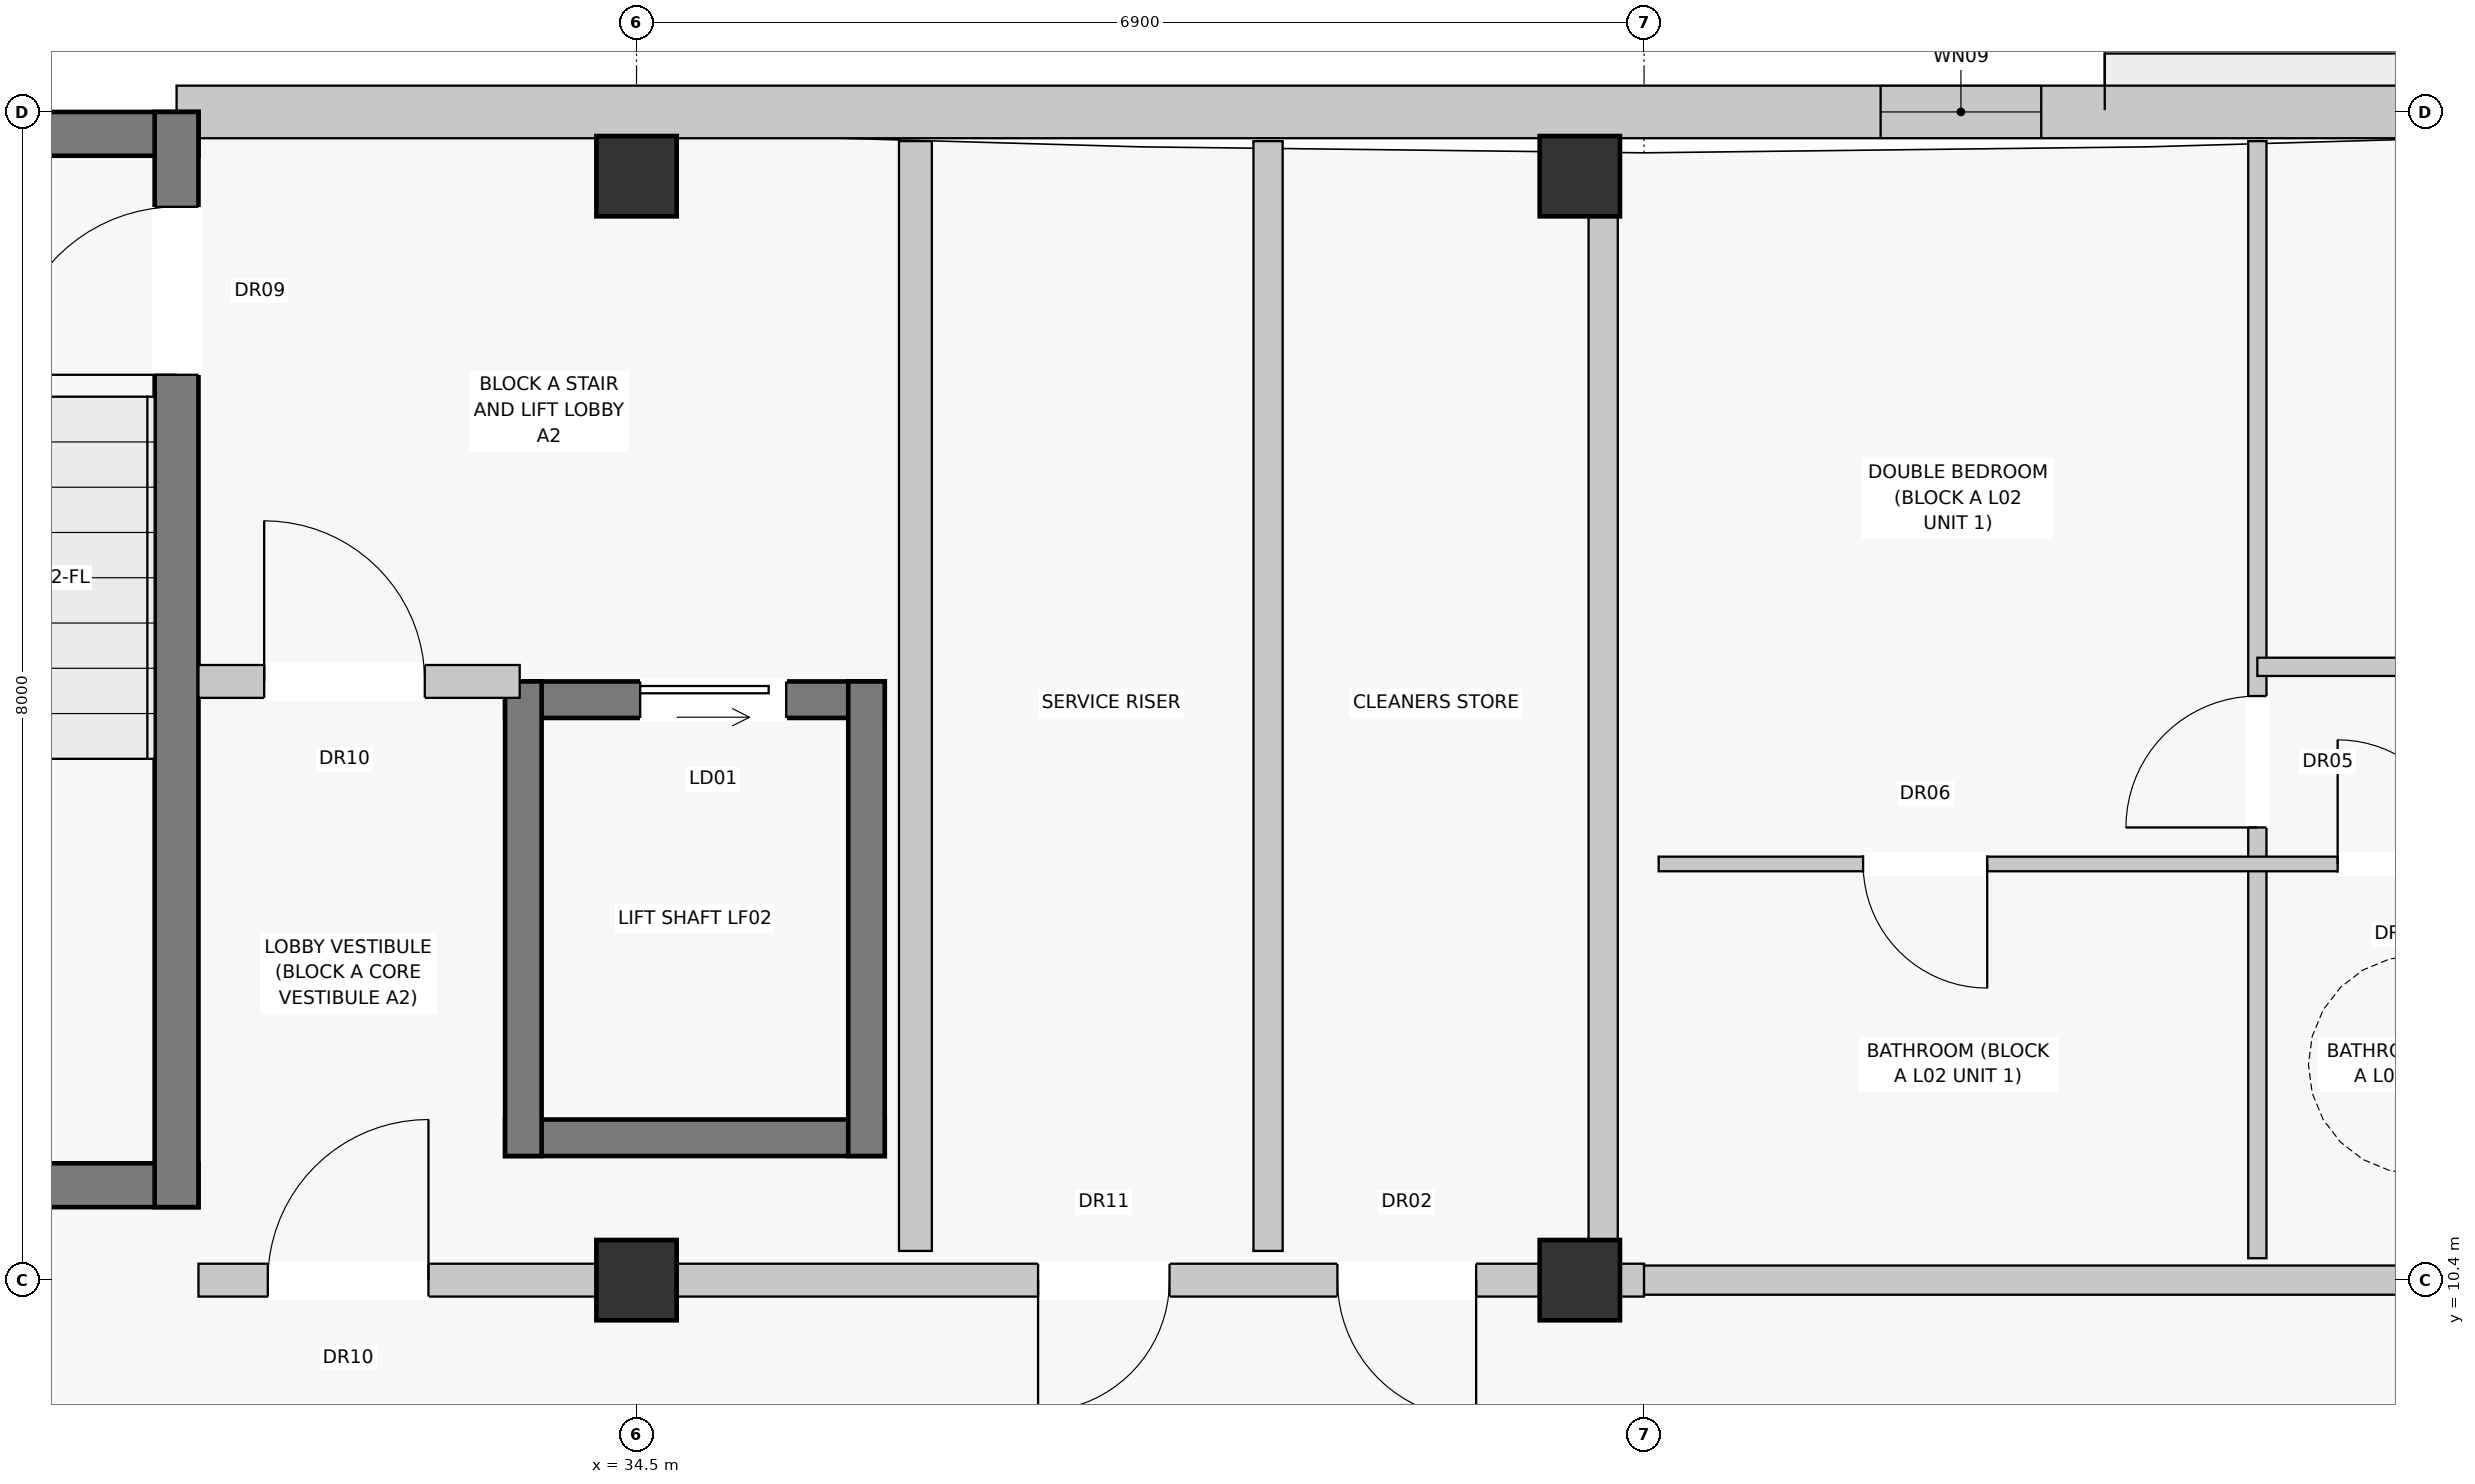
"""IFC4 building model, lengths in metres.
Left out: names, types, materials, properties, quantities, classifications, styles, units other than length and angle.
Written with IfcOpenShell. Run it as: python <this file> out.ifc"""

import sys

from ifc_helpers import new_model, si_unit, direction, frame, frame_2d, origin, origin_with_axes, origin_2d, place, context, subcontext, project, spatial, rectangle, extrude, element, fill, save


model = new_model("IFC4")
c1 = context("Model", 3, precision=1e-05, world=origin(), true_north=direction((0.0, 1.0)))
c2 = subcontext(c1, "Body", "Model", "MODEL_VIEW")
j1 = project(units=[si_unit("LENGTHUNIT", "METRE"), si_unit("PLANEANGLEUNIT", "RADIAN")], contexts=[c1])
p1 = place(None, origin())
s1 = spatial("IfcSite", under=j1, at=p1, CompositionType="ELEMENT")
p2 = place(p1, origin())
s2 = spatial("IfcBuilding", under=s1, at=p2, CompositionType="ELEMENT")
p3 = place(p2, frame((0.0, 0.0, 8.0)))
s3 = spatial("IfcBuildingStorey", under=s2, at=p3, CompositionType="ELEMENT", Elevation=8.0)
for number, where, z_axis, x_axis in (
    (1, (34.5, 10.4, 0.0), (0.0, 0.0, 1.0), (1.0, 0.0, 0.0)),
    (2, (34.5, 17.96, 0.0), (0.0, 0.0, 1.0), (1.0, 0.0, 0.0)),
    (3, (40.96, 10.4, 0.0), (0.0, 0.0, 1.0), (1.0, 0.0, 0.0)),
    (4, (40.96, 17.96, 0.0), (0.0, 0.0, 1.0), (1.0, 0.0, 0.0)),
):
    element("IfcColumn", number, at=place(p3, frame(where, z_axis=z_axis, x_axis=x_axis)), inside=s3, PredefinedType="COLUMN", context=c2, shape_type="SweptSolid", body=[
        extrude(rectangle(XDim=0.55, YDim=0.55, at=origin_2d()), origin(), (0.0, 0.0, 1.0), 3.2),
    ])
p4 = place(p3, frame((31.35, 18.4, 0.0), z_axis=(0.0, 0.0, 1.0), x_axis=(1.0, 0.0, 0.0)))
e5 = element("IfcWall", 5, at=p4, inside=s3, PredefinedType="STANDARD", context=c2, shape_type="SweptSolid", body=[
    extrude(rectangle(XDim=23.68, YDim=0.36, at=frame_2d((11.84, 0.0))), origin(), (0.0, 0.0, 1.0), 2.94),
])
p5 = place(p4, frame((15.27, 0.0, 0.0)))
e6 = element("IfcOpeningElement", 6, at=p5, cuts=e5, PredefinedType="OPENING", context=c2, shape_type="SweptSolid", body=[
    extrude(rectangle(XDim=1.05, YDim=2.12, at=frame_2d((0.525, 1.06))), frame((0.0, 0.192, 0.0), z_axis=(0.0, -1.0, 0.0), x_axis=(1.0, 0.0, 0.0)), (0.0, 0.0, 1.0), 0.384),
])
p6 = place(p4, frame((11.67, 0.0, 0.72)))
e7 = element("IfcOpeningElement", 7, at=p6, cuts=e5, PredefinedType="OPENING", context=c2, shape_type="SweptSolid", body=[
    extrude(rectangle(XDim=1.1, YDim=1.5, at=frame_2d((0.55, 0.75))), frame((0.0, 0.192, 0.0), z_axis=(0.0, -1.0, 0.0), x_axis=(1.0, 0.0, 0.0)), (0.0, 0.0, 1.0), 0.384),
])
p7 = place(p4, frame((17.52, 0.0, 0.9)))
e8 = element("IfcOpeningElement", 8, at=p7, cuts=e5, PredefinedType="OPENING", context=c2, shape_type="SweptSolid", body=[
    extrude(rectangle(XDim=0.95, YDim=1.55, at=frame_2d((0.475, 0.775))), frame((0.0, 0.192, 0.0), z_axis=(0.0, -1.0, 0.0), x_axis=(1.0, 0.0, 0.0)), (0.0, 0.0, 1.0), 0.384),
])
p8 = place(p4, frame((20.67, 0.0, 0.72)))
e9 = element("IfcOpeningElement", 9, at=p8, cuts=e5, PredefinedType="OPENING", context=c2, shape_type="SweptSolid", body=[
    extrude(rectangle(XDim=1.1, YDim=1.5, at=frame_2d((0.55, 0.75))), frame((0.0, 0.192, 0.0), z_axis=(0.0, -1.0, 0.0), x_axis=(1.0, 0.0, 0.0)), (0.0, 0.0, 1.0), 0.384),
])
for number, where, z_axis, x_axis in (
    (10, (27.9, 18.25, 0.0), (0.0, 0.0, 1.0), (1.0, 0.0, 0.0)),
    (11, (27.9, 11.05, 0.0), (0.0, 0.0, 1.0), (1.0, 0.0, 0.0)),
):
    element("IfcWall", number, at=place(p3, frame(where, z_axis=z_axis, x_axis=x_axis)), inside=s3, PredefinedType="SHEAR", context=c2, shape_type="SweptSolid", body=[
        extrude(rectangle(XDim=3.6, YDim=0.3, at=frame_2d((1.8, 0.0))), origin(), (0.0, 0.0, 1.0), 2.94),
    ])
p9 = place(p3, frame((31.35, 10.9, 0.0), z_axis=(0.0, 0.0, 1.0), x_axis=(0.0, 1.0, 0.0)))
e12 = element("IfcWall", 12, at=p9, inside=s3, PredefinedType="SHEAR", context=c2, shape_type="SweptSolid", body=[
    extrude(rectangle(XDim=7.5, YDim=0.3, at=frame_2d((3.75, 0.0))), origin(), (0.0, 0.0, 1.0), 2.94),
])
p10 = place(p9, frame((5.7, 0.0, 0.0)))
e13 = element("IfcOpeningElement", 13, at=p10, cuts=e12, PredefinedType="OPENING", context=c2, shape_type="SweptSolid", body=[
    extrude(rectangle(XDim=1.15, YDim=2.15, at=frame_2d((0.575, 1.075))), frame((0.0, 0.162, 0.0), z_axis=(0.0, -1.0, 0.0), x_axis=(1.0, 0.0, 0.0)), (0.0, 0.0, 1.0), 0.324),
])
p11 = place(p3, frame((33.6, 14.375, 0.0), z_axis=(0.0, 0.0, 1.0), x_axis=(1.0, 0.0, 0.0)))
e14 = element("IfcWall", 14, at=p11, inside=s3, PredefinedType="SHEAR", context=c2, shape_type="SweptSolid", body=[
    extrude(rectangle(XDim=2.6, YDim=0.25, at=frame_2d((1.3, 0.0))), origin(), (0.0, 0.0, 1.0), 2.94),
])
p12 = place(p11, frame((0.925, 0.0, 0.0)))
e15 = element("IfcOpeningElement", 15, at=p12, cuts=e14, PredefinedType="OPENING", context=c2, shape_type="SweptSolid", body=[
    extrude(rectangle(XDim=1.0, YDim=2.1, at=frame_2d((0.5, 1.05))), frame((0.0, 0.137, 0.0), z_axis=(0.0, -1.0, 0.0), x_axis=(1.0, 0.0, 0.0)), (0.0, 0.0, 1.0), 0.274),
])
p13 = place(p3, frame((33.6, 11.375, 0.0), z_axis=(0.0, 0.0, 1.0), x_axis=(1.0, 0.0, 0.0)))
e16 = element("IfcWall", 16, at=p13, inside=s3, PredefinedType="SHEAR", context=c2, shape_type="SweptSolid", body=[
    extrude(rectangle(XDim=2.6, YDim=0.25, at=frame_2d((1.3, 0.0))), origin(), (0.0, 0.0, 1.0), 2.94),
])
for number, where, z_axis, x_axis in (
    (17, (33.725, 11.25, 0.0), (0.0, 0.0, 1.0), (0.0, 1.0, 0.0)),
    (18, (36.075, 11.25, 0.0), (0.0, 0.0, 1.0), (0.0, 1.0, 0.0)),
):
    element("IfcWall", number, at=place(p3, frame(where, z_axis=z_axis, x_axis=x_axis)), inside=s3, PredefinedType="SHEAR", context=c2, shape_type="SweptSolid", body=[
        extrude(rectangle(XDim=3.25, YDim=0.25, at=frame_2d((1.625, 0.0))), origin(), (0.0, 0.0, 1.0), 2.94),
    ])
p14 = place(p3, frame((36.41, 10.6, 0.0), z_axis=(0.0, 0.0, 1.0), x_axis=(0.0, 1.0, 0.0)))
e19 = element("IfcWall", 19, at=p14, inside=s3, PredefinedType="PARTITIONING", context=c2, shape_type="SweptSolid", body=[
    extrude(rectangle(XDim=7.6, YDim=0.225, at=frame_2d((3.8, 0.0))), origin(), (0.0, 0.0, 1.0), 2.59),
])
p15 = place(p3, frame((31.5, 14.5, 0.0), z_axis=(0.0, 0.0, 1.0), x_axis=(1.0, 0.0, 0.0)))
e20 = element("IfcWall", 20, at=p15, inside=s3, PredefinedType="PARTITIONING", context=c2, shape_type="SweptSolid", body=[
    extrude(rectangle(XDim=2.2, YDim=0.225, at=frame_2d((1.1, 0.0))), origin(), (0.0, 0.0, 1.0), 2.94),
])
p16 = place(p15, frame((0.45, 0.0, 0.0)))
e21 = element("IfcOpeningElement", 21, at=p16, cuts=e20, PredefinedType="OPENING", context=c2, shape_type="SweptSolid", body=[
    extrude(rectangle(XDim=1.1, YDim=2.15, at=frame_2d((0.55, 1.075))), frame((0.0, 0.125, 0.0), z_axis=(0.0, -1.0, 0.0), x_axis=(1.0, 0.0, 0.0)), (0.0, 0.0, 1.0), 0.249),
])
for number, where, z_axis, x_axis in (
    (22, (38.825, 10.6, 0.0), (0.0, 0.0, 1.0), (0.0, 1.0, 0.0)),
    (23, (41.12, 10.6, 0.0), (0.0, 0.0, 1.0), (0.0, 1.0, 0.0)),
):
    element("IfcWall", number, at=place(p3, frame(where, z_axis=z_axis, x_axis=x_axis)), inside=s3, PredefinedType="PARTITIONING", context=c2, shape_type="SweptSolid", body=[
        extrude(rectangle(XDim=7.6, YDim=0.2, at=frame_2d((3.8, 0.0))), origin(), (0.0, 0.0, 1.0), 2.94),
    ])
p17 = place(p3, frame((31.5, 10.4, 0.0), z_axis=(0.0, 0.0, 1.0), x_axis=(1.0, 0.0, 0.0)))
e24 = element("IfcWall", 24, at=p17, inside=s3, PredefinedType="PARTITIONING", context=c2, shape_type="SweptSolid", body=[
    extrude(rectangle(XDim=9.9, YDim=0.225, at=frame_2d((4.95, 0.0))), origin(), (0.0, 0.0, 1.0), 2.38),
])
p18 = place(p17, frame((0.475, 0.0, 0.0)))
e25 = element("IfcOpeningElement", 25, at=p18, cuts=e24, PredefinedType="OPENING", context=c2, shape_type="SweptSolid", body=[
    extrude(rectangle(XDim=1.1, YDim=2.15, at=frame_2d((0.55, 1.075))), frame((0.0, 0.125, 0.0), z_axis=(0.0, -1.0, 0.0), x_axis=(1.0, 0.0, 0.0)), (0.0, 0.0, 1.0), 0.249),
])
p19 = place(p17, frame((5.75, 0.0, 0.0)))
e26 = element("IfcOpeningElement", 26, at=p19, cuts=e24, PredefinedType="OPENING", context=c2, shape_type="SweptSolid", body=[
    extrude(rectangle(XDim=0.9, YDim=2.1, at=frame_2d((0.45, 1.05))), frame((0.0, 0.125, 0.0), z_axis=(0.0, -1.0, 0.0), x_axis=(1.0, 0.0, 0.0)), (0.0, 0.0, 1.0), 0.249),
])
p20 = place(p17, frame((7.8, 0.0, 0.0)))
e27 = element("IfcOpeningElement", 27, at=p20, cuts=e24, PredefinedType="OPENING", context=c2, shape_type="SweptSolid", body=[
    extrude(rectangle(XDim=0.95, YDim=2.15, at=frame_2d((0.475, 1.075))), frame((0.0, 0.125, 0.0), z_axis=(0.0, -1.0, 0.0), x_axis=(1.0, 0.0, 0.0)), (0.0, 0.0, 1.0), 0.249),
])
p21 = place(p3, frame((41.4, 10.4, 0.0), z_axis=(0.0, 0.0, 1.0), x_axis=(1.0, 0.0, 0.0)))
e28 = element("IfcWall", 28, at=p21, inside=s3, PredefinedType="PARTITIONING", context=c2, shape_type="SweptSolid", body=[
    extrude(rectangle(XDim=13.8, YDim=0.2, at=frame_2d((6.9, 0.0))), origin(), (0.0, 0.0, 1.0), 2.38),
])
p22 = place(p21, frame((9.6, 0.0, 0.0)))
e29 = element("IfcOpeningElement", 29, at=p22, cuts=e28, PredefinedType="OPENING", context=c2, shape_type="SweptSolid", body=[
    extrude(rectangle(XDim=0.95, YDim=2.15, at=frame_2d((0.475, 1.075))), frame((0.0, 0.112, 0.0), z_axis=(0.0, -1.0, 0.0), x_axis=(1.0, 0.0, 0.0)), (0.0, 0.0, 1.0), 0.224),
])
p23 = place(p3, frame((45.6, 10.55, 0.0), z_axis=(0.0, 0.0, 1.0), x_axis=(0.0, 1.0, 0.0)))
e30 = element("IfcWall", 30, at=p23, inside=s3, PredefinedType="PARTITIONING", context=c2, shape_type="SweptSolid", body=[
    extrude(rectangle(XDim=7.65, YDim=0.125, at=frame_2d((3.825, 0.0))), origin(), (0.0, 0.0, 1.0), 2.94),
])
p24 = place(p23, frame((2.95, 0.0, 0.0)))
e31 = element("IfcOpeningElement", 31, at=p24, cuts=e30, PredefinedType="OPENING", context=c2, shape_type="SweptSolid", body=[
    extrude(rectangle(XDim=0.9, YDim=2.1, at=frame_2d((0.45, 1.05))), frame((0.0, 0.074, 0.0), z_axis=(0.0, -1.0, 0.0), x_axis=(1.0, 0.0, 0.0)), (0.0, 0.0, 1.0), 0.149),
])
p25 = place(p3, frame((41.5, 13.25, 0.0), z_axis=(0.0, 0.0, 1.0), x_axis=(1.0, 0.0, 0.0)))
e32 = element("IfcWall", 32, at=p25, inside=s3, PredefinedType="PARTITIONING", context=c2, shape_type="SweptSolid", body=[
    extrude(rectangle(XDim=8.6, YDim=0.1, at=frame_2d((4.3, 0.0))), origin(), (0.0, 0.0, 1.0), 2.94),
])
p26 = place(p25, frame((1.4, 0.0, 0.0)))
e33 = element("IfcOpeningElement", 33, at=p26, cuts=e32, PredefinedType="OPENING", context=c2, shape_type="SweptSolid", body=[
    extrude(rectangle(XDim=0.85, YDim=2.05, at=frame_2d((0.425, 1.025))), frame((0.0, 0.062, 0.0), z_axis=(0.0, -1.0, 0.0), x_axis=(1.0, 0.0, 0.0)), (0.0, 0.0, 1.0), 0.124),
])
p27 = place(p25, frame((4.65, 0.0, 0.0)))
e34 = element("IfcOpeningElement", 34, at=p27, cuts=e32, PredefinedType="OPENING", context=c2, shape_type="SweptSolid", body=[
    extrude(rectangle(XDim=0.85, YDim=2.05, at=frame_2d((0.425, 1.025))), frame((0.0, 0.062, 0.0), z_axis=(0.0, -1.0, 0.0), x_axis=(1.0, 0.0, 0.0)), (0.0, 0.0, 1.0), 0.124),
])
p28 = place(p25, frame((6.8, 0.0, 0.0)))
e35 = element("IfcOpeningElement", 35, at=p28, cuts=e32, PredefinedType="OPENING", context=c2, shape_type="SweptSolid", body=[
    extrude(rectangle(XDim=0.85, YDim=2.1, at=frame_2d((0.425, 1.05))), frame((0.0, 0.062, 0.0), z_axis=(0.0, -1.0, 0.0), x_axis=(1.0, 0.0, 0.0)), (0.0, 0.0, 1.0), 0.124),
])
p29 = place(p3, frame((45.6, 14.6, 0.0), z_axis=(0.0, 0.0, 1.0), x_axis=(1.0, 0.0, 0.0)))
e36 = element("IfcWall", 36, at=p29, inside=s3, PredefinedType="PARTITIONING", context=c2, shape_type="SweptSolid", body=[
    extrude(rectangle(XDim=4.5, YDim=0.125, at=frame_2d((2.25, 0.0))), origin(), (0.0, 0.0, 1.0), 2.94),
])
p30 = place(p29, frame((1.6, 0.0, 0.0)))
e37 = element("IfcOpeningElement", 37, at=p30, cuts=e36, PredefinedType="OPENING", context=c2, shape_type="SweptSolid", body=[
    extrude(rectangle(XDim=0.9, YDim=2.1, at=frame_2d((0.45, 1.05))), frame((0.0, 0.074, 0.0), z_axis=(0.0, -1.0, 0.0), x_axis=(1.0, 0.0, 0.0)), (0.0, 0.0, 1.0), 0.149),
])
p31 = place(p6, origin_with_axes())
e38 = element("IfcWindow", 38, at=p31, inside=s3, PartitioningType="SINGLE_PANEL", PredefinedType="WINDOW", context=c2, shape_type="SweptSolid", body=[
    extrude(rectangle(XDim=1.1, YDim=1.5, at=frame_2d((0.55, 0.75))), frame((0.0, 0.03, 0.0), z_axis=(0.0, -1.0, 0.0), x_axis=(1.0, 0.0, 0.0)), (0.0, 0.0, 1.0), 0.06),
])
fill(e7, e38)
p32 = place(p10, origin_with_axes())
e39 = element("IfcDoor", 39, at=p32, inside=s3, OperationType="SINGLE_SWING_LEFT", PredefinedType="DOOR", context=c2, shape_type="SweptSolid", body=[
    extrude(rectangle(XDim=1.15, YDim=2.15, at=frame_2d((0.575, 1.075))), frame((0.0, 0.025, 0.0), z_axis=(0.0, -1.0, 0.0), x_axis=(1.0, 0.0, 0.0)), (0.0, 0.0, 1.0), 0.05),
])
fill(e13, e39)
p33 = place(p12, origin_with_axes())
e40 = element("IfcDoor", 40, at=p33, inside=s3, OperationType="SLIDING_TO_LEFT", PredefinedType="DOOR", context=c2, shape_type="SweptSolid", body=[
    extrude(rectangle(XDim=1.0, YDim=2.1, at=frame_2d((0.5, 1.05))), frame((0.0, 0.025, 0.0), z_axis=(0.0, -1.0, 0.0), x_axis=(1.0, 0.0, 0.0)), (0.0, 0.0, 1.0), 0.05),
])
fill(e15, e40)
p34 = place(p16, origin_with_axes())
e41 = element("IfcDoor", 41, at=p34, inside=s3, OperationType="SINGLE_SWING_LEFT", PredefinedType="DOOR", context=c2, shape_type="SweptSolid", body=[
    extrude(rectangle(XDim=1.1, YDim=2.15, at=frame_2d((0.55, 1.075))), frame((0.0, 0.025, 0.0), z_axis=(0.0, -1.0, 0.0), x_axis=(1.0, 0.0, 0.0)), (0.0, 0.0, 1.0), 0.05),
])
fill(e21, e41)
p35 = place(p18, origin_with_axes())
e42 = element("IfcDoor", 42, at=p35, inside=s3, OperationType="SINGLE_SWING_RIGHT", PredefinedType="DOOR", context=c2, shape_type="SweptSolid", body=[
    extrude(rectangle(XDim=1.1, YDim=2.15, at=frame_2d((0.55, 1.075))), frame((0.0, 0.025, 0.0), z_axis=(0.0, -1.0, 0.0), x_axis=(1.0, 0.0, 0.0)), (0.0, 0.0, 1.0), 0.05),
])
fill(e25, e42)
p36 = place(p19, frame((0.9, 0.0, 0.0), z_axis=(0.0, 0.0, 1.0), x_axis=(-1.0, 0.0, 0.0)))
e43 = element("IfcDoor", 43, at=p36, inside=s3, OperationType="SINGLE_SWING_LEFT", PredefinedType="DOOR", context=c2, shape_type="SweptSolid", body=[
    extrude(rectangle(XDim=0.9, YDim=2.1, at=frame_2d((0.45, 1.05))), frame((0.0, 0.025, 0.0), z_axis=(0.0, -1.0, 0.0), x_axis=(1.0, 0.0, 0.0)), (0.0, 0.0, 1.0), 0.05),
])
fill(e26, e43)
p37 = place(p20, frame((0.95, 0.0, 0.0), z_axis=(0.0, 0.0, 1.0), x_axis=(-1.0, 0.0, 0.0)))
e44 = element("IfcDoor", 44, at=p37, inside=s3, OperationType="SINGLE_SWING_RIGHT", PredefinedType="DOOR", context=c2, shape_type="SweptSolid", body=[
    extrude(rectangle(XDim=0.95, YDim=2.15, at=frame_2d((0.475, 1.075))), frame((0.0, 0.025, 0.0), z_axis=(0.0, -1.0, 0.0), x_axis=(1.0, 0.0, 0.0)), (0.0, 0.0, 1.0), 0.05),
])
fill(e27, e44)
p38 = place(p24, origin_with_axes())
e45 = element("IfcDoor", 45, at=p38, inside=s3, OperationType="SINGLE_SWING_LEFT", PredefinedType="DOOR", context=c2, shape_type="SweptSolid", body=[
    extrude(rectangle(XDim=0.9, YDim=2.1, at=frame_2d((0.45, 1.05))), frame((0.0, 0.025, 0.0), z_axis=(0.0, -1.0, 0.0), x_axis=(1.0, 0.0, 0.0)), (0.0, 0.0, 1.0), 0.05),
])
fill(e31, e45)
p39 = place(p26, frame((0.85, 0.0, 0.0), z_axis=(0.0, 0.0, 1.0), x_axis=(-1.0, 0.0, 0.0)))
e46 = element("IfcDoor", 46, at=p39, inside=s3, OperationType="SINGLE_SWING_RIGHT", PredefinedType="DOOR", context=c2, shape_type="SweptSolid", body=[
    extrude(rectangle(XDim=0.85, YDim=2.05, at=frame_2d((0.425, 1.025))), frame((0.0, 0.025, 0.0), z_axis=(0.0, -1.0, 0.0), x_axis=(1.0, 0.0, 0.0)), (0.0, 0.0, 1.0), 0.05),
])
fill(e33, e46)
p40 = place(p27, origin_with_axes())
e47 = element("IfcDoor", 47, at=p40, inside=s3, OperationType="SINGLE_SWING_LEFT", PredefinedType="DOOR", context=c2, shape_type="SweptSolid", body=[
    extrude(rectangle(XDim=0.85, YDim=2.05, at=frame_2d((0.425, 1.025))), frame((0.0, 0.025, 0.0), z_axis=(0.0, -1.0, 0.0), x_axis=(1.0, 0.0, 0.0)), (0.0, 0.0, 1.0), 0.05),
])
fill(e34, e47)
save(model, sys.argv[1])
